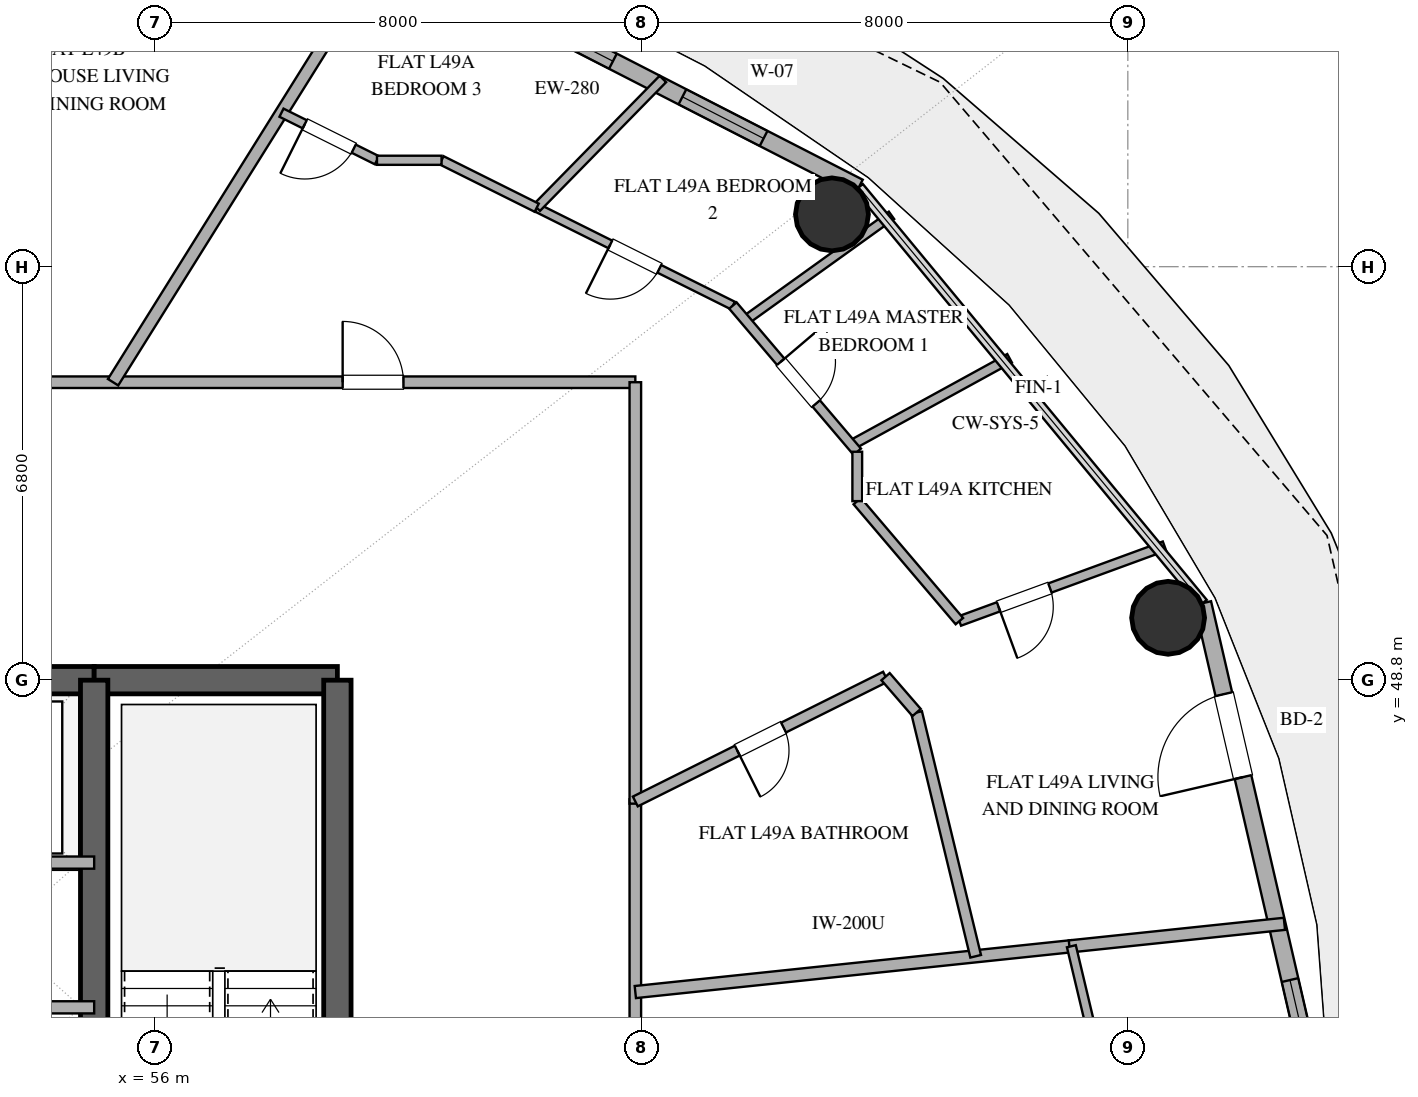
"""IFC4 building model, lengths in metres.
Left out: names, types, materials, properties, quantities, classifications, styles, units other than length and angle.
Written with IfcOpenShell. Run it as: python <this file> out.ifc"""

import sys

from ifc_helpers import new_model, si_unit, direction, frame, frame_2d, origin, origin_2d, place, context, subcontext, project, spatial, rectangle, hollow_circle, extrude, element, fill, save


model = new_model("IFC4")
c1 = context("Model", 3, precision=1e-05, world=origin(), true_north=direction((0.0, 1.0)))
c2 = subcontext(c1, "Body", "Model", "MODEL_VIEW")
j1 = project(units=[si_unit("LENGTHUNIT", "METRE"), si_unit("PLANEANGLEUNIT", "RADIAN")], contexts=[c1])
p1 = place(None, origin())
s1 = spatial("IfcSite", under=j1, at=p1, CompositionType="ELEMENT")
p2 = place(p1, origin())
s2 = spatial("IfcBuilding", under=s1, at=p2, CompositionType="ELEMENT")
p3 = place(p2, frame((0.0, 0.0, 193.8)))
s3 = spatial("IfcBuildingStorey", under=s2, at=p3, CompositionType="ELEMENT", Elevation=193.8)
p4 = place(p3, frame((41.0, 48.8, 0.0), z_axis=(0.0, 0.0, 1.0), x_axis=(1.0, 0.0, 0.0)))
e1 = element("IfcWall", 1, at=p4, inside=s3, PredefinedType="SHEAR", context=c2, shape_type="SweptSolid", body=[
    extrude(rectangle(XDim=14.0, YDim=0.45, at=frame_2d((7.0, 0.0))), origin(), (0.0, 0.0, 1.0), 3.38),
])
p5 = place(p4, frame((6.1, 0.0, 0.0)))
e2 = element("IfcOpeningElement", 2, at=p5, cuts=e1, PredefinedType="OPENING", context=c2, shape_type="SweptSolid", body=[
    extrude(rectangle(XDim=1.8, YDim=2.25, at=frame_2d((0.9, 1.125))), frame((0.0, 0.235, 0.0), z_axis=(0.0, -1.0, 0.0), x_axis=(1.0, 0.0, 0.0)), (0.0, 0.0, 1.0), 0.47),
])
p6 = place(p3, frame((55.0, 48.8, 0.0), z_axis=(0.0, 0.0, 1.0), x_axis=(1.0, 0.0, 0.0)))
e3 = element("IfcWall", 3, at=p6, inside=s3, PredefinedType="SHEAR", context=c2, shape_type="SweptSolid", body=[
    extrude(rectangle(XDim=4.0, YDim=0.45, at=frame_2d((2.0, 0.0))), origin(), (0.0, 0.0, 1.0), 3.38),
])
p7 = place(p3, frame((59.0, 35.2, 0.0), z_axis=(0.0, 0.0, 1.0), x_axis=(0.0, 1.0, 0.0)))
e4 = element("IfcWall", 4, at=p7, inside=s3, PredefinedType="SHEAR", context=c2, shape_type="SweptSolid", body=[
    extrude(rectangle(XDim=13.6, YDim=0.45, at=frame_2d((6.8, 0.0))), origin(), (0.0, 0.0, 1.0), 3.38),
])
p8 = place(p3, frame((55.0, 35.2, 0.0), z_axis=(0.0, 0.0, 1.0), x_axis=(0.0, 1.0, 0.0)))
e5 = element("IfcWall", 5, at=p8, inside=s3, PredefinedType="SHEAR", context=c2, shape_type="SweptSolid", body=[
    extrude(rectangle(XDim=13.6, YDim=0.45, at=frame_2d((6.8, 0.0))), origin(), (0.0, 0.0, 1.0), 3.38),
])
p9 = place(p8, frame((1.15, 0.0, 0.0)))
e6 = element("IfcOpeningElement", 6, at=p9, cuts=e5, PredefinedType="OPENING", context=c2, shape_type="SweptSolid", body=[
    extrude(rectangle(XDim=1.1, YDim=2.2, at=frame_2d((0.55, 1.1))), frame((0.0, 0.235, 0.0), z_axis=(0.0, -1.0, 0.0), x_axis=(1.0, 0.0, 0.0)), (0.0, 0.0, 1.0), 0.47),
])
for number, where, z_axis, x_axis in (
    (7, (72.662, 49.826, 0.0), (0.0, 0.0, 1.0), (1.0, 0.0, 0.0)),
    (8, (67.134, 56.46, 0.0), (0.0, 0.0, 1.0), (1.0, 0.0, 0.0)),
):
    element("IfcColumn", number, at=place(p3, frame(where, z_axis=z_axis, x_axis=x_axis)), inside=s3, PredefinedType="COLUMN", context=c2, shape_type="SweptSolid", body=[
        extrude(hollow_circle(Radius=0.6, WallThickness=0.032, at=origin_2d()), origin(), (0.0, 0.0, 1.0), 3.38),
    ])
p10 = place(p3, frame((75.099, 42.0, 0.0), z_axis=(0.0, 0.0, 1.0), x_axis=(-0.225473184558, 0.974249374157, 0.0)))
e9 = element("IfcWall", 9, at=p10, inside=s3, PredefinedType="SOLIDWALL", context=c2, shape_type="SweptSolid", body=[
    extrude(rectangle(XDim=8.28, YDim=0.28, at=frame_2d((4.14, 0.0))), origin(), (0.0, 0.0, 1.0), 3.38),
])
p11 = place(p10, frame((5.344, 0.0, 0.0)))
e10 = element("IfcOpeningElement", 10, at=p11, cuts=e9, PredefinedType="OPENING", context=c2, shape_type="SweptSolid", body=[
    extrude(rectangle(XDim=1.4, YDim=2.2, at=frame_2d((0.7, 1.1))), frame((0.0, 0.15, 0.0), z_axis=(0.0, -1.0, 0.0), x_axis=(1.0, 0.0, 0.0)), (0.0, 0.0, 1.0), 0.3),
])
p12 = place(p10, frame((0.918, 0.0, 0.85)))
e11 = element("IfcOpeningElement", 11, at=p12, cuts=e9, PredefinedType="OPENING", context=c2, shape_type="SweptSolid", body=[
    extrude(rectangle(XDim=1.0, YDim=1.8, at=frame_2d((0.5, 0.9))), frame((0.0, 0.15, 0.0), z_axis=(0.0, -1.0, 0.0), x_axis=(1.0, 0.0, 0.0)), (0.0, 0.0, 1.0), 0.3),
])
p13 = place(p3, frame((67.576, 56.906, 0.0), z_axis=(0.0, 0.0, 1.0), x_axis=(-0.889872523182, 0.456209263919, 0.0)))
e12 = element("IfcWall", 12, at=p13, inside=s3, PredefinedType="SOLIDWALL", context=c2, shape_type="SweptSolid", body=[
    extrude(rectangle(XDim=10.016, YDim=0.28, at=frame_2d((5.008, 0.0))), origin(), (0.0, 0.0, 1.0), 3.38),
])
p14 = place(p13, frame((1.76, 0.0, 0.85)))
e13 = element("IfcOpeningElement", 13, at=p14, cuts=e12, PredefinedType="OPENING", context=c2, shape_type="SweptSolid", body=[
    extrude(rectangle(XDim=1.5, YDim=1.8, at=frame_2d((0.75, 0.9))), frame((0.0, 0.15, 0.0), z_axis=(0.0, -1.0, 0.0), x_axis=(1.0, 0.0, 0.0)), (0.0, 0.0, 1.0), 0.3),
])
p15 = place(p13, frame((4.545, 0.0, 0.85)))
e14 = element("IfcOpeningElement", 14, at=p15, cuts=e12, PredefinedType="OPENING", context=c2, shape_type="SweptSolid", body=[
    extrude(rectangle(XDim=1.35, YDim=1.8, at=frame_2d((0.675, 0.9))), frame((0.0, 0.15, 0.0), z_axis=(0.0, -1.0, 0.0), x_axis=(1.0, 0.0, 0.0)), (0.0, 0.0, 1.0), 0.3),
])
p16 = place(p13, frame((6.51, 0.0, 0.85)))
e15 = element("IfcOpeningElement", 15, at=p16, cuts=e12, PredefinedType="OPENING", context=c2, shape_type="SweptSolid", body=[
    extrude(rectangle(XDim=1.35, YDim=1.8, at=frame_2d((0.675, 0.9))), frame((0.0, 0.15, 0.0), z_axis=(0.0, -1.0, 0.0), x_axis=(1.0, 0.0, 0.0)), (0.0, 0.0, 1.0), 0.3),
])
for number, where, z_axis, x_axis in (
    (16, (52.05, 43.42, 0.0), (0.0, 0.0, 1.0), (1.0, 0.0, 0.0)),
    (17, (52.05, 45.8, 0.0), (0.0, 0.0, 1.0), (1.0, 0.0, 0.0)),
):
    element("IfcWall", number, at=place(p3, frame(where, z_axis=z_axis, x_axis=x_axis)), inside=s3, PredefinedType="SOLIDWALL", context=c2, shape_type="SweptSolid", body=[
        extrude(rectangle(XDim=2.95, YDim=0.2, at=frame_2d((1.475, 0.0))), origin(), (0.0, 0.0, 1.0), 2.74),
    ])
p17 = place(p3, frame((44.784, 53.7, 0.0), z_axis=(0.0, 0.0, 1.0), x_axis=(1.0, 0.0, 0.0)))
e18 = element("IfcWall", 18, at=p17, inside=s3, PredefinedType="PARTITIONING", context=c2, shape_type="SweptSolid", body=[
    extrude(rectangle(XDim=19.116, YDim=0.19, at=frame_2d((9.558, 0.0))), origin(), (0.0, 0.0, 1.0), 2.74),
])
p18 = place(p17, frame((14.302, 0.0, 0.0)))
e19 = element("IfcOpeningElement", 19, at=p18, cuts=e18, PredefinedType="OPENING", context=c2, shape_type="SweptSolid", body=[
    extrude(rectangle(XDim=1.0, YDim=2.2, at=frame_2d((0.5, 1.1))), frame((0.0, 0.105, 0.0), z_axis=(0.0, -1.0, 0.0), x_axis=(1.0, 0.0, 0.0)), (0.0, 0.0, 1.0), 0.21),
])
p19 = place(p17, frame((6.783, 0.0, 0.0)))
e20 = element("IfcOpeningElement", 20, at=p19, cuts=e18, PredefinedType="OPENING", context=c2, shape_type="SweptSolid", body=[
    extrude(rectangle(XDim=1.0, YDim=2.2, at=frame_2d((0.5, 1.1))), frame((0.0, 0.105, 0.0), z_axis=(0.0, -1.0, 0.0), x_axis=(1.0, 0.0, 0.0)), (0.0, 0.0, 1.0), 0.21),
])
p20 = place(p3, frame((63.9, 46.841, 0.0), z_axis=(0.0, 0.0, 1.0), x_axis=(0.0, -1.0, 0.0)))
e21 = element("IfcWall", 21, at=p20, inside=s3, PredefinedType="PARTITIONING", context=c2, shape_type="SweptSolid", body=[
    extrude(rectangle(XDim=12.632, YDim=0.19, at=frame_2d((6.316, 0.0))), origin(), (0.0, 0.0, 1.0), 2.74),
])
p21 = place(p3, frame((63.9, 53.7, 0.0), z_axis=(0.0, 0.0, 1.0), x_axis=(0.0, -1.0, 0.0)))
e22 = element("IfcWall", 22, at=p21, inside=s3, PredefinedType="PARTITIONING", context=c2, shape_type="SweptSolid", body=[
    extrude(rectangle(XDim=6.931, YDim=0.19, at=frame_2d((3.465, 0.0))), origin(), (0.0, 0.0, 1.0), 2.74),
])
p22 = place(p3, frame((63.9, 43.671, 0.0), z_axis=(0.0, 0.0, 1.0), x_axis=(0.994523063153, 0.104517351942, 0.0)))
e23 = element("IfcWall", 23, at=p22, inside=s3, PredefinedType="PARTITIONING", context=c2, shape_type="SweptSolid", body=[
    extrude(rectangle(XDim=7.211, YDim=0.2, at=frame_2d((3.605, 0.0))), origin(), (0.0, 0.0, 1.0), 2.74),
])
p23 = place(p3, frame((55.311, 53.7, 0.0), z_axis=(0.0, 0.0, 1.0), x_axis=(0.529914717401, 0.848050937315, 0.0)))
e24 = element("IfcWall", 24, at=p23, inside=s3, PredefinedType="PARTITIONING", context=c2, shape_type="SweptSolid", body=[
    extrude(rectangle(XDim=8.599, YDim=0.2, at=frame_2d((4.299, 0.0))), origin(), (0.0, 0.0, 1.0), 2.74),
])
p24 = place(p3, frame((68.016, 48.858, 0.0), z_axis=(0.0, 0.0, 1.0), x_axis=(-0.894872643331, -0.446321579377, 0.0)))
e25 = element("IfcWall", 25, at=p24, inside=s3, PredefinedType="PLUMBINGWALL", context=c2, shape_type="SweptSolid", body=[
    extrude(rectangle(XDim=4.599, YDim=0.18, at=frame_2d((2.3, 0.0))), origin(), (0.0, 0.0, 1.0), 2.74),
])
p25 = place(p24, frame((1.875, 0.0, 0.0)))
e26 = element("IfcOpeningElement", 26, at=p25, cuts=e25, PredefinedType="OPENING", context=c2, shape_type="SweptSolid", body=[
    extrude(rectangle(XDim=0.85, YDim=2.1, at=frame_2d((0.425, 1.05))), frame((0.0, 0.1, 0.0), z_axis=(0.0, -1.0, 0.0), x_axis=(1.0, 0.0, 0.0)), (0.0, 0.0, 1.0), 0.2),
])
p26 = place(p3, frame((69.498, 44.26, 0.0), z_axis=(0.0, 0.0, 1.0), x_axis=(-0.235510241151, 0.97187186723, 0.0)))
e27 = element("IfcWall", 27, at=p26, inside=s3, PredefinedType="PLUMBINGWALL", context=c2, shape_type="SweptSolid", body=[
    extrude(rectangle(XDim=4.125, YDim=0.18, at=frame_2d((2.062, 0.0))), origin(), (0.0, 0.0, 1.0), 2.74),
])
p27 = place(p3, frame((65.505, 54.961, 0.0), z_axis=(0.0, 0.0, 1.0), x_axis=(-0.894941244144, 0.4461840086, 0.0)))
e28 = element("IfcWall", 28, at=p27, inside=s3, PredefinedType="PARTITIONING", context=c2, shape_type="SweptSolid", body=[
    extrude(rectangle(XDim=3.605, YDim=0.14, at=frame_2d((1.803, 0.0))), origin(), (0.0, 0.0, 1.0), 2.74),
])
p28 = place(p27, frame((1.353, 0.0, 0.0)))
e29 = element("IfcOpeningElement", 29, at=p28, cuts=e28, PredefinedType="OPENING", context=c2, shape_type="SweptSolid", body=[
    extrude(rectangle(XDim=0.9, YDim=2.1, at=frame_2d((0.45, 1.05))), frame((0.0, 0.08, 0.0), z_axis=(0.0, -1.0, 0.0), x_axis=(1.0, 0.0, 0.0)), (0.0, 0.0, 1.0), 0.16),
])
p29 = place(p3, frame((72.603, 51.006, 0.0), z_axis=(0.0, 0.0, 1.0), x_axis=(-0.939057046145, -0.343761347572, 0.0)))
e30 = element("IfcWall", 30, at=p29, inside=s3, PredefinedType="PLUMBINGWALL", context=c2, shape_type="SweptSolid", body=[
    extrude(rectangle(XDim=3.592, YDim=0.16, at=frame_2d((1.796, 0.0))), origin(), (0.0, 0.0, 1.0), 2.74),
])
p30 = place(p29, frame((2.006, 0.0, 0.0)))
e31 = element("IfcOpeningElement", 31, at=p30, cuts=e30, PredefinedType="OPENING", context=c2, shape_type="SweptSolid", body=[
    extrude(rectangle(XDim=0.9, YDim=2.1, at=frame_2d((0.45, 1.05))), frame((0.0, 0.09, 0.0), z_axis=(0.0, -1.0, 0.0), x_axis=(1.0, 0.0, 0.0)), (0.0, 0.0, 1.0), 0.18),
])
p31 = place(p3, frame((74.575, 44.793, 0.0), z_axis=(0.0, 0.0, 1.0), x_axis=(-0.994516359121, -0.104581123727, 0.0)))
e32 = element("IfcWall", 32, at=p31, inside=s3, PredefinedType="PARTITIONING", context=c2, shape_type="SweptSolid", body=[
    extrude(rectangle(XDim=3.555, YDim=0.2, at=frame_2d((1.778, 0.0))), origin(), (0.0, 0.0, 1.0), 2.74),
])
p32 = place(p3, frame((67.455, 52.668, 0.0), z_axis=(0.0, 0.0, 1.0), x_axis=(0.876839283097, 0.480783601653, 0.0)))
e33 = element("IfcWall", 33, at=p32, inside=s3, PredefinedType="PLUMBINGWALL", context=c2, shape_type="SweptSolid", body=[
    extrude(rectangle(XDim=2.965, YDim=0.16, at=frame_2d((1.482, 0.0))), origin(), (0.0, 0.0, 1.0), 2.74),
])
p33 = place(p3, frame((64.353, 58.687, 0.0), z_axis=(0.0, 0.0, 1.0), x_axis=(-0.699905055024, -0.714235895172, 0.0)))
e34 = element("IfcWall", 34, at=p33, inside=s3, PredefinedType="PARTITIONING", context=c2, shape_type="SweptSolid", body=[
    extrude(rectangle(XDim=2.964, YDim=0.15, at=frame_2d((1.482, 0.0))), origin(), (0.0, 0.0, 1.0), 2.74),
])
p34 = place(p3, frame((68.113, 56.444, 0.0), z_axis=(0.0, 0.0, 1.0), x_axis=(-0.812258557349, -0.583297553581, 0.0)))
e35 = element("IfcWall", 35, at=p34, inside=s3, PredefinedType="PARTITIONING", context=c2, shape_type="SweptSolid", body=[
    extrude(rectangle(XDim=2.958, YDim=0.15, at=frame_2d((1.479, 0.0))), origin(), (0.0, 0.0, 1.0), 2.74),
])
p35 = place(p3, frame((65.505, 54.961, 0.0), z_axis=(0.0, 0.0, 1.0), x_axis=(0.647888606369, -0.761735094201, 0.0)))
e36 = element("IfcWall", 36, at=p35, inside=s3, PredefinedType="PLUMBINGWALL", context=c2, shape_type="SweptSolid", body=[
    extrude(rectangle(XDim=3.157, YDim=0.16, at=frame_2d((1.578, 0.0))), origin(), (0.0, 0.0, 1.0), 2.74),
])
p36 = place(p35, frame((1.215, 0.0, 0.0)))
e37 = element("IfcOpeningElement", 37, at=p36, cuts=e36, PredefinedType="OPENING", context=c2, shape_type="SweptSolid", body=[
    extrude(rectangle(XDim=0.9, YDim=2.1, at=frame_2d((0.45, 1.05))), frame((0.0, 0.09, 0.0), z_axis=(0.0, -1.0, 0.0), x_axis=(1.0, 0.0, 0.0)), (0.0, 0.0, 1.0), 0.18),
])
p37 = place(p3, frame((69.229, 49.771, 0.0), z_axis=(0.0, 0.0, 1.0), x_axis=(-0.648055845939, 0.761592818076, 0.0)))
e38 = element("IfcWall", 38, at=p37, inside=s3, PredefinedType="PLUMBINGWALL", context=c2, shape_type="SweptSolid", body=[
    extrude(rectangle(XDim=2.591, YDim=0.16, at=frame_2d((1.295, 0.0))), origin(), (0.0, 0.0, 1.0), 2.74),
])
p38 = place(p3, frame((71.649, 42.0, 0.0), z_axis=(0.0, 0.0, 1.0), x_axis=(-0.231642596653, 0.972800959814, 0.0)))
e39 = element("IfcWall", 39, at=p38, inside=s3, PredefinedType="PARTITIONING", context=c2, shape_type="SweptSolid", body=[
    extrude(rectangle(XDim=2.493, YDim=0.15, at=frame_2d((1.246, 0.0))), origin(), (0.0, 0.0, 1.0), 2.74),
])
p39 = place(p3, frame((59.651, 57.35, 0.0), z_axis=(0.0, 0.0, 1.0), x_axis=(-0.895038630404, 0.445988621027, 0.0)))
e40 = element("IfcWall", 40, at=p39, inside=s3, PredefinedType="PARTITIONING", context=c2, shape_type="SweptSolid", body=[
    extrude(rectangle(XDim=1.754, YDim=0.15, at=frame_2d((0.877, 0.0))), origin(), (0.0, 0.0, 1.0), 2.74),
])
p40 = place(p39, frame((0.427, 0.0, 0.0)))
e41 = element("IfcOpeningElement", 41, at=p40, cuts=e40, PredefinedType="OPENING", context=c2, shape_type="SweptSolid", body=[
    extrude(rectangle(XDim=0.9, YDim=2.1, at=frame_2d((0.45, 1.05))), frame((0.0, 0.085, 0.0), z_axis=(0.0, -1.0, 0.0), x_axis=(1.0, 0.0, 0.0)), (0.0, 0.0, 1.0), 0.17),
])
p41 = place(p3, frame((62.278, 56.57, 0.0), z_axis=(0.0, 0.0, 1.0), x_axis=(-0.894929238491, 0.446208088333, 0.0)))
e42 = element("IfcWall", 42, at=p41, inside=s3, PredefinedType="PARTITIONING", context=c2, shape_type="SweptSolid", body=[
    extrude(rectangle(XDim=1.749, YDim=0.15, at=frame_2d((0.875, 0.0))), origin(), (0.0, 0.0, 1.0), 2.74),
])
p42 = place(p3, frame((60.713, 57.35, 0.0), z_axis=(0.0, 0.0, 1.0), x_axis=(-1.0, 0.0, 0.0)))
e43 = element("IfcWall", 43, at=p42, inside=s3, PredefinedType="PARTITIONING", context=c2, shape_type="SweptSolid", body=[
    extrude(rectangle(XDim=1.062, YDim=0.15, at=frame_2d((0.531, 0.0))), origin(), (0.0, 0.0, 1.0), 2.74),
])
p43 = place(p3, frame((67.55, 51.744, 0.0), z_axis=(0.0, 0.0, 1.0), x_axis=(0.0, 1.0, 0.0)))
e44 = element("IfcWall", 44, at=p43, inside=s3, PredefinedType="PLUMBINGWALL", context=c2, shape_type="SweptSolid", body=[
    extrude(rectangle(XDim=0.812, YDim=0.16, at=frame_2d((0.406, 0.0))), origin(), (0.0, 0.0, 1.0), 2.74),
])
p44 = place(p3, frame((68.526, 48.268, 0.0), z_axis=(0.0, 0.0, 1.0), x_axis=(-0.654572928685, 0.755998863116, 0.0)))
e45 = element("IfcWall", 45, at=p44, inside=s3, PredefinedType="PLUMBINGWALL", context=c2, shape_type="SweptSolid", body=[
    extrude(rectangle(XDim=0.78, YDim=0.18, at=frame_2d((0.39, 0.0))), origin(), (0.0, 0.0, 1.0), 2.74),
])
p45 = place(p11, origin())
e46 = element("IfcDoor", 46, at=p45, inside=s3, OperationType="SINGLE_SWING_LEFT", PredefinedType="DOOR", context=c2, shape_type="SweptSolid", body=[
    extrude(rectangle(XDim=1.4, YDim=2.2, at=frame_2d((0.7, 1.1))), frame((0.0, 0.025, 0.0), z_axis=(0.0, -1.0, 0.0), x_axis=(1.0, 0.0, 0.0)), (0.0, 0.0, 1.0), 0.05),
])
fill(e10, e46)
p46 = place(p14, origin())
e47 = element("IfcWindow", 47, at=p46, inside=s3, PartitioningType="SINGLE_PANEL", PredefinedType="WINDOW", context=c2, shape_type="SweptSolid", body=[
    extrude(rectangle(XDim=1.5, YDim=1.8, at=frame_2d((0.75, 0.9))), frame((0.0, 0.03, 0.0), z_axis=(0.0, -1.0, 0.0), x_axis=(1.0, 0.0, 0.0)), (0.0, 0.0, 1.0), 0.06),
])
fill(e13, e47)
p47 = place(p15, origin())
e48 = element("IfcWindow", 48, at=p47, inside=s3, PartitioningType="SINGLE_PANEL", PredefinedType="WINDOW", context=c2, shape_type="SweptSolid", body=[
    extrude(rectangle(XDim=1.35, YDim=1.8, at=frame_2d((0.675, 0.9))), frame((0.0, 0.03, 0.0), z_axis=(0.0, -1.0, 0.0), x_axis=(1.0, 0.0, 0.0)), (0.0, 0.0, 1.0), 0.06),
])
fill(e14, e48)
p48 = place(p12, origin())
e49 = element("IfcWindow", 49, at=p48, inside=s3, PartitioningType="SINGLE_PANEL", PredefinedType="WINDOW", context=c2, shape_type="SweptSolid", body=[
    extrude(rectangle(XDim=1.0, YDim=1.8, at=frame_2d((0.5, 0.9))), frame((0.0, 0.03, 0.0), z_axis=(0.0, -1.0, 0.0), x_axis=(1.0, 0.0, 0.0)), (0.0, 0.0, 1.0), 0.06),
])
fill(e11, e49)
p49 = place(p18, origin())
e50 = element("IfcDoor", 50, at=p49, inside=s3, OperationType="SINGLE_SWING_LEFT", PredefinedType="DOOR", context=c2, shape_type="SweptSolid", body=[
    extrude(rectangle(XDim=1.0, YDim=2.2, at=frame_2d((0.5, 1.1))), frame((0.0, 0.025, 0.0), z_axis=(0.0, -1.0, 0.0), x_axis=(1.0, 0.0, 0.0)), (0.0, 0.0, 1.0), 0.05),
])
fill(e19, e50)
p50 = place(p25, origin())
e51 = element("IfcDoor", 51, at=p50, inside=s3, OperationType="SINGLE_SWING_RIGHT", PredefinedType="DOOR", context=c2, shape_type="SweptSolid", body=[
    extrude(rectangle(XDim=0.85, YDim=2.1, at=frame_2d((0.425, 1.05))), frame((0.0, 0.025, 0.0), z_axis=(0.0, -1.0, 0.0), x_axis=(1.0, 0.0, 0.0)), (0.0, 0.0, 1.0), 0.05),
])
fill(e26, e51)
p51 = place(p28, origin())
e52 = element("IfcDoor", 52, at=p51, inside=s3, OperationType="SINGLE_SWING_RIGHT", PredefinedType="DOOR", context=c2, shape_type="SweptSolid", body=[
    extrude(rectangle(XDim=0.9, YDim=2.1, at=frame_2d((0.45, 1.05))), frame((0.0, 0.025, 0.0), z_axis=(0.0, -1.0, 0.0), x_axis=(1.0, 0.0, 0.0)), (0.0, 0.0, 1.0), 0.05),
])
fill(e29, e52)
p52 = place(p30, origin())
e53 = element("IfcDoor", 53, at=p52, inside=s3, OperationType="SINGLE_SWING_RIGHT", PredefinedType="DOOR", context=c2, shape_type="SweptSolid", body=[
    extrude(rectangle(XDim=0.9, YDim=2.1, at=frame_2d((0.45, 1.05))), frame((0.0, 0.025, 0.0), z_axis=(0.0, -1.0, 0.0), x_axis=(1.0, 0.0, 0.0)), (0.0, 0.0, 1.0), 0.05),
])
fill(e31, e53)
p53 = place(p36, origin())
e54 = element("IfcDoor", 54, at=p53, inside=s3, OperationType="SINGLE_SWING_LEFT", PredefinedType="DOOR", context=c2, shape_type="SweptSolid", body=[
    extrude(rectangle(XDim=0.9, YDim=2.1, at=frame_2d((0.45, 1.05))), frame((0.0, 0.025, 0.0), z_axis=(0.0, -1.0, 0.0), x_axis=(1.0, 0.0, 0.0)), (0.0, 0.0, 1.0), 0.05),
])
fill(e37, e54)
p54 = place(p40, origin())
e55 = element("IfcDoor", 55, at=p54, inside=s3, OperationType="SINGLE_SWING_RIGHT", PredefinedType="DOOR", context=c2, shape_type="SweptSolid", body=[
    extrude(rectangle(XDim=0.9, YDim=2.1, at=frame_2d((0.45, 1.05))), frame((0.0, 0.025, 0.0), z_axis=(0.0, -1.0, 0.0), x_axis=(1.0, 0.0, 0.0)), (0.0, 0.0, 1.0), 0.05),
])
fill(e41, e55)
save(model, sys.argv[1])
